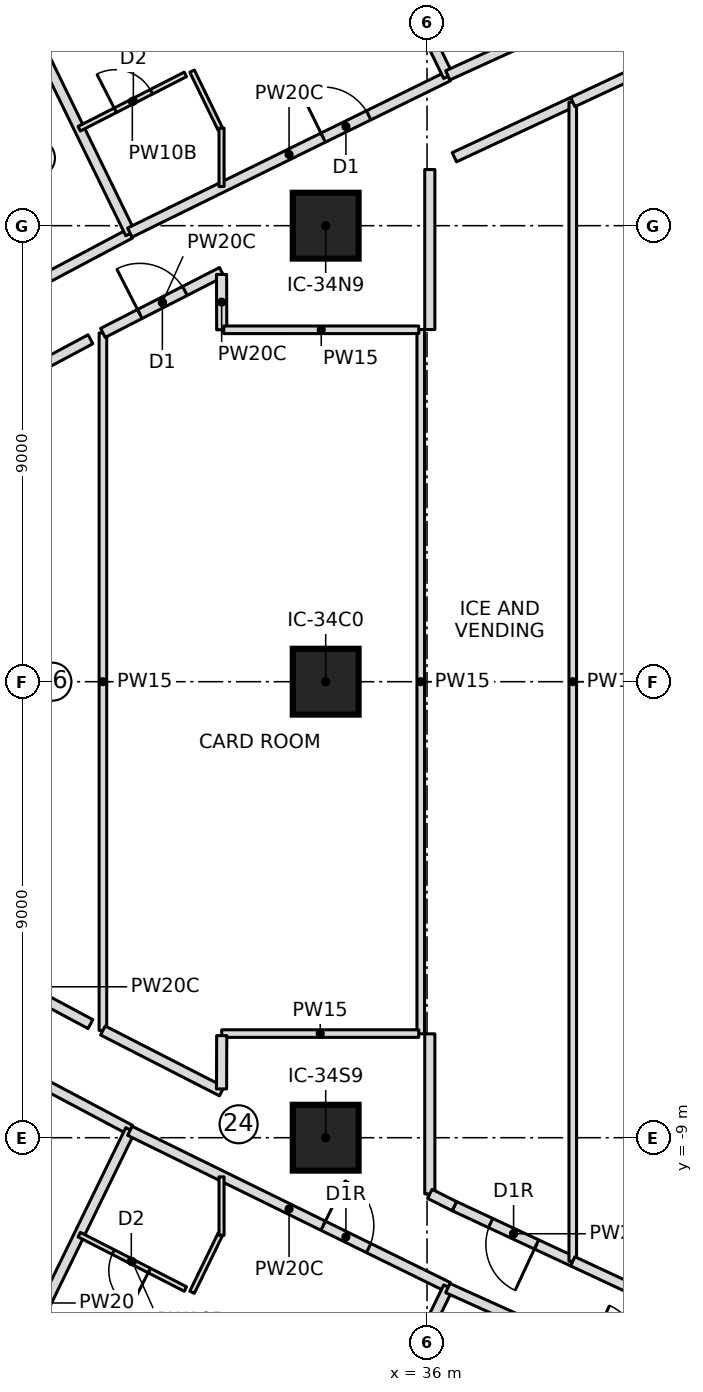
"""IFC4 building model, lengths in metres.
Left out: names, types, materials, properties, quantities, classifications, styles, units other than length and angle.
Written with IfcOpenShell. Run it as: python <this file> out.ifc"""

import sys

from ifc_helpers import new_model, si_unit, direction, frame, frame_2d, origin, origin_2d, place, context, subcontext, project, spatial, rectangle, extrude, element, fill, save


model = new_model("IFC4")
c1 = context("Model", 3, precision=1e-05, world=origin(), true_north=direction((0.0, 1.0)))
c2 = subcontext(c1, "Body", "Model", "MODEL_VIEW")
j1 = project(units=[si_unit("LENGTHUNIT", "METRE"), si_unit("PLANEANGLEUNIT", "RADIAN")], contexts=[c1])
p1 = place(None, origin())
s1 = spatial("IfcSite", under=j1, at=p1, CompositionType="ELEMENT")
p2 = place(p1, origin())
s2 = spatial("IfcBuilding", under=s1, at=p2, CompositionType="ELEMENT")
p3 = place(p2, frame((0.0, 0.0, 68.0)))
s3 = spatial("IfcBuildingStorey", under=s2, at=p3, CompositionType="ELEMENT", Elevation=68.0)
for number, where, z_axis, x_axis in (
    (1, (34.0, -9.0, 0.0), (0.0, 0.0, 1.0), (1.0, 0.0, 0.0)),
    (2, (34.0, 0.0, 0.0), (0.0, 0.0, 1.0), (1.0, 0.0, 0.0)),
    (3, (34.0, 9.0, 0.0), (0.0, 0.0, 1.0), (1.0, 0.0, 0.0)),
):
    element("IfcColumn", number, at=place(p3, frame(where, z_axis=z_axis, x_axis=x_axis)), inside=s3, PredefinedType="COLUMN", context=c2, shape_type="SweptSolid", body=[
        extrude(rectangle(XDim=1.3, YDim=1.3, at=origin_2d()), origin(), (0.0, 0.0, 1.0), 3.55),
    ])
p4 = place(p3, frame((23.957, 5.564, 0.0), z_axis=(0.0, 0.0, 1.0), x_axis=(0.883455325405, 0.468515408513, 0.0)))
e4 = element("IfcWall", 4, at=p4, inside=s3, PredefinedType="PARTITIONING", context=c2, shape_type="SweptSolid", body=[
    extrude(rectangle(XDim=7.004, YDim=0.2, at=frame_2d((3.502, 0.0))), origin(), (0.0, 0.0, 1.0), 3.25),
])
p5 = place(p4, frame((3.7, 0.0, 0.0)))
e5 = element("IfcOpeningElement", 5, at=p5, cuts=e4, PredefinedType="OPENING", context=c2, shape_type="SweptSolid", body=[
    extrude(rectangle(XDim=1.0, YDim=2.1, at=frame_2d((0.5, 1.05))), frame((0.0, 0.11, 0.0), z_axis=(0.0, -1.0, 0.0), x_axis=(1.0, 0.0, 0.0)), (0.0, 0.0, 1.0), 0.22),
])
p6 = place(p3, frame((30.144, 8.846, 0.0), z_axis=(0.0, 0.0, 1.0), x_axis=(-0.438185054829, 0.898884785567, 0.0)))
e6 = element("IfcWall", 6, at=p6, inside=s3, PredefinedType="PARTITIONING", context=c2, shape_type="SweptSolid", body=[
    extrude(rectangle(XDim=7.601, YDim=0.2, at=frame_2d((3.801, 0.0))), origin(), (0.0, 0.0, 1.0), 3.25),
])
p7 = place(p3, frame((30.135, 8.864, 0.0), z_axis=(0.0, 0.0, 1.0), x_axis=(0.897599118183, 0.44081268475, 0.0)))
e7 = element("IfcWall", 7, at=p7, inside=s3, PredefinedType="PARTITIONING", context=c2, shape_type="SweptSolid", body=[
    extrude(rectangle(XDim=7.0, YDim=0.2, at=frame_2d((3.5, 0.0))), origin(), (0.0, 0.0, 1.0), 3.25),
])
p8 = place(p7, frame((4.25, 0.0, 0.0)))
e8 = element("IfcOpeningElement", 8, at=p8, cuts=e7, PredefinedType="OPENING", context=c2, shape_type="SweptSolid", body=[
    extrude(rectangle(XDim=1.0, YDim=2.1, at=frame_2d((0.5, 1.05))), frame((0.0, 0.11, 0.0), z_axis=(0.0, -1.0, 0.0), x_axis=(1.0, 0.0, 0.0)), (0.0, 0.0, 1.0), 0.22),
])
p9 = place(p3, frame((29.136, 10.914, 0.0), z_axis=(0.0, 0.0, 1.0), x_axis=(0.890219804082, 0.45553122881, 0.0)))
e9 = element("IfcWall", 9, at=p9, inside=s3, PredefinedType="PARTITIONING", context=c2, shape_type="SweptSolid", body=[
    extrude(rectangle(XDim=2.354, YDim=0.1, at=frame_2d((1.177, 0.0))), origin(), (0.0, 0.0, 1.0), 3.25),
])
p10 = place(p9, frame((0.8, 0.0, 0.0)))
e10 = element("IfcOpeningElement", 10, at=p10, cuts=e9, PredefinedType="OPENING", context=c2, shape_type="SweptSolid", body=[
    extrude(rectangle(XDim=0.8, YDim=2.1, at=frame_2d((0.4, 1.05))), frame((0.0, 0.06, 0.0), z_axis=(0.0, -1.0, 0.0), x_axis=(1.0, 0.0, 0.0)), (0.0, 0.0, 1.0), 0.12),
])
p11 = place(p3, frame((31.363, 12.05, 0.0), z_axis=(0.0, 0.0, 1.0), x_axis=(0.438356099343, -0.898801385273, 0.0)))
e11 = element("IfcWall", 11, at=p11, inside=s3, PredefinedType="PARTITIONING", context=c2, shape_type="SweptSolid", body=[
    extrude(rectangle(XDim=1.282, YDim=0.1, at=frame_2d((0.641, 0.0))), origin(), (0.0, 0.0, 1.0), 3.25),
])
p12 = place(p3, frame((36.419, 11.949, 0.0), z_axis=(0.0, 0.0, 1.0), x_axis=(-0.438197705697, 0.898878618459, 0.0)))
e12 = element("IfcWall", 12, at=p12, inside=s3, PredefinedType="PARTITIONING", context=c2, shape_type="SweptSolid", body=[
    extrude(rectangle(XDim=7.601, YDim=0.2, at=frame_2d((3.801, 0.0))), origin(), (0.0, 0.0, 1.0), 3.25),
])
p13 = place(p3, frame((42.784, 14.867, 0.0), z_axis=(0.0, 0.0, 1.0), x_axis=(-0.910238677692, -0.414083988622, 0.0)))
e13 = element("IfcWall", 13, at=p13, inside=s3, PredefinedType="PARTITIONING", context=c2, shape_type="SweptSolid", body=[
    extrude(rectangle(XDim=7.003, YDim=0.2, at=frame_2d((3.501, 0.0))), origin(), (0.0, 0.0, 1.0), 3.25),
])
p14 = place(p13, frame((0.35, 0.0, 0.0)))
e14 = element("IfcOpeningElement", 14, at=p14, cuts=e13, PredefinedType="OPENING", context=c2, shape_type="SweptSolid", body=[
    extrude(rectangle(XDim=1.0, YDim=2.1, at=frame_2d((0.5, 1.05))), frame((0.0, 0.11, 0.0), z_axis=(0.0, -1.0, 0.0), x_axis=(1.0, 0.0, 0.0)), (0.0, 0.0, 1.0), 0.22),
])
p15 = place(p3, frame((23.957, -5.564, 0.0), z_axis=(0.0, 0.0, 1.0), x_axis=(0.883455325405, -0.468515408513, 0.0)))
e15 = element("IfcWall", 15, at=p15, inside=s3, PredefinedType="PARTITIONING", context=c2, shape_type="SweptSolid", body=[
    extrude(rectangle(XDim=7.004, YDim=0.2, at=frame_2d((3.502, 0.0))), origin(), (0.0, 0.0, 1.0), 3.25),
])
p16 = place(p15, frame((3.7, 0.0, 0.0)))
e16 = element("IfcOpeningElement", 16, at=p16, cuts=e15, PredefinedType="OPENING", context=c2, shape_type="SweptSolid", body=[
    extrude(rectangle(XDim=1.0, YDim=2.1, at=frame_2d((0.5, 1.05))), frame((0.0, 0.11, 0.0), z_axis=(0.0, -1.0, 0.0), x_axis=(1.0, 0.0, 0.0)), (0.0, 0.0, 1.0), 0.22),
])
p17 = place(p3, frame((26.813, -15.678, 0.0), z_axis=(0.0, 0.0, 1.0), x_axis=(0.438185054829, 0.898884785567, 0.0)))
e17 = element("IfcWall", 17, at=p17, inside=s3, PredefinedType="PARTITIONING", context=c2, shape_type="SweptSolid", body=[
    extrude(rectangle(XDim=7.601, YDim=0.2, at=frame_2d((3.801, 0.0))), origin(), (0.0, 0.0, 1.0), 3.25),
])
p18 = place(p3, frame((30.135, -8.864, 0.0), z_axis=(0.0, 0.0, 1.0), x_axis=(0.897599118183, -0.44081268475, 0.0)))
e18 = element("IfcWall", 18, at=p18, inside=s3, PredefinedType="PARTITIONING", context=c2, shape_type="SweptSolid", body=[
    extrude(rectangle(XDim=7.0, YDim=0.2, at=frame_2d((3.5, 0.0))), origin(), (0.0, 0.0, 1.0), 3.25),
])
p19 = place(p18, frame((4.25, 0.0, 0.0)))
e19 = element("IfcOpeningElement", 19, at=p19, cuts=e18, PredefinedType="OPENING", context=c2, shape_type="SweptSolid", body=[
    extrude(rectangle(XDim=1.0, YDim=2.1, at=frame_2d((0.5, 1.05))), frame((0.0, 0.11, 0.0), z_axis=(0.0, -1.0, 0.0), x_axis=(1.0, 0.0, 0.0)), (0.0, 0.0, 1.0), 0.22),
])
p20 = place(p3, frame((31.925, -10.898, 0.0), z_axis=(0.0, 0.0, 1.0), x_axis=(-0.438356099343, -0.898801385273, 0.0)))
e20 = element("IfcWall", 20, at=p20, inside=s3, PredefinedType="PARTITIONING", context=c2, shape_type="SweptSolid", body=[
    extrude(rectangle(XDim=1.282, YDim=0.1, at=frame_2d((0.641, 0.0))), origin(), (0.0, 0.0, 1.0), 3.25),
])
p21 = place(p3, frame((31.232, -11.986, 0.0), z_axis=(0.0, 0.0, 1.0), x_axis=(-0.890219804082, 0.45553122881, 0.0)))
e21 = element("IfcWall", 21, at=p21, inside=s3, PredefinedType="PARTITIONING", context=c2, shape_type="SweptSolid", body=[
    extrude(rectangle(XDim=2.354, YDim=0.1, at=frame_2d((1.177, 0.0))), origin(), (0.0, 0.0, 1.0), 3.25),
])
p22 = place(p21, frame((0.8, 0.0, 0.0)))
e22 = element("IfcOpeningElement", 22, at=p22, cuts=e21, PredefinedType="OPENING", context=c2, shape_type="SweptSolid", body=[
    extrude(rectangle(XDim=0.8, YDim=2.1, at=frame_2d((0.4, 1.05))), frame((0.0, 0.06, 0.0), z_axis=(0.0, -1.0, 0.0), x_axis=(1.0, 0.0, 0.0)), (0.0, 0.0, 1.0), 0.12),
])
p23 = place(p3, frame((33.088, -18.782, 0.0), z_axis=(0.0, 0.0, 1.0), x_axis=(0.438197705697, 0.898878618459, 0.0)))
e23 = element("IfcWall", 23, at=p23, inside=s3, PredefinedType="PARTITIONING", context=c2, shape_type="SweptSolid", body=[
    extrude(rectangle(XDim=7.601, YDim=0.2, at=frame_2d((3.801, 0.0))), origin(), (0.0, 0.0, 1.0), 3.25),
])
p24 = place(p3, frame((36.41, -11.968, 0.0), z_axis=(0.0, 0.0, 1.0), x_axis=(0.911422478094, -0.411471829443, 0.0)))
e24 = element("IfcWall", 24, at=p24, inside=s3, PredefinedType="PARTITIONING", context=c2, shape_type="SweptSolid", body=[
    extrude(rectangle(XDim=7.003, YDim=0.2, at=frame_2d((3.501, 0.0))), origin(), (0.0, 0.0, 1.0), 3.25),
])
p25 = place(p24, frame((3.05, 0.0, 0.0)))
e25 = element("IfcOpeningElement", 25, at=p25, cuts=e24, PredefinedType="OPENING", context=c2, shape_type="SweptSolid", body=[
    extrude(rectangle(XDim=1.0, YDim=2.1, at=frame_2d((0.5, 1.05))), frame((0.0, 0.11, 0.0), z_axis=(0.0, -1.0, 0.0), x_axis=(1.0, 0.0, 0.0)), (0.0, 0.0, 1.0), 0.22),
])
p26 = place(p3, frame((29.357, -6.758, 0.0), z_axis=(0.0, 0.0, 1.0), x_axis=(-0.881637943627, 0.471926409895, 0.0)))
e26 = element("IfcWall", 26, at=p26, inside=s3, PredefinedType="PARTITIONING", context=c2, shape_type="SweptSolid", body=[
    extrude(rectangle(XDim=3.124, YDim=0.2, at=frame_2d((1.562, 0.0))), origin(), (0.0, 0.0, 1.0), 3.25),
])
p27 = place(p26, frame((1.062, 0.0, 0.0)))
e27 = element("IfcOpeningElement", 27, at=p27, cuts=e26, PredefinedType="OPENING", context=c2, shape_type="SweptSolid", body=[
    extrude(rectangle(XDim=1.0, YDim=2.1, at=frame_2d((0.5, 1.05))), frame((0.0, 0.11, 0.0), z_axis=(0.0, -1.0, 0.0), x_axis=(1.0, 0.0, 0.0)), (0.0, 0.0, 1.0), 0.22),
])
p28 = place(p3, frame((26.604, 5.284, 0.0), z_axis=(0.0, 0.0, 1.0), x_axis=(0.881637943627, 0.471926409895, 0.0)))
e28 = element("IfcWall", 28, at=p28, inside=s3, PredefinedType="PARTITIONING", context=c2, shape_type="SweptSolid", body=[
    extrude(rectangle(XDim=3.124, YDim=0.2, at=frame_2d((1.562, 0.0))), origin(), (0.0, 0.0, 1.0), 3.25),
])
p29 = place(p3, frame((29.604, -6.884, 0.0), z_axis=(0.0, 0.0, 1.0), x_axis=(0.0, 1.0, 0.0)))
e29 = element("IfcWall", 29, at=p29, inside=s3, PredefinedType="PARTITIONING", context=c2, shape_type="SweptSolid", body=[
    extrude(rectangle(XDim=13.768, YDim=0.15, at=frame_2d((6.884, 0.0))), origin(), (0.0, 0.0, 1.0), 3.25),
])
p30 = place(p3, frame((29.604, 6.884, 0.0), z_axis=(0.0, 0.0, 1.0), x_axis=(0.890220210981, 0.455530433628, 0.0)))
e30 = element("IfcWall", 30, at=p30, inside=s3, PredefinedType="PARTITIONING", context=c2, shape_type="SweptSolid", body=[
    extrude(rectangle(XDim=2.636, YDim=0.2, at=frame_2d((1.318, 0.0))), origin(), (0.0, 0.0, 1.0), 3.25),
])
p31 = place(p30, frame((0.818, 0.0, 0.0)))
e31 = element("IfcOpeningElement", 31, at=p31, cuts=e30, PredefinedType="OPENING", context=c2, shape_type="SweptSolid", body=[
    extrude(rectangle(XDim=1.0, YDim=2.1, at=frame_2d((0.5, 1.05))), frame((0.0, 0.11, 0.0), z_axis=(0.0, -1.0, 0.0), x_axis=(1.0, 0.0, 0.0)), (0.0, 0.0, 1.0), 0.22),
])
p32 = place(p3, frame((31.95, -8.085, 0.0), z_axis=(0.0, 0.0, 1.0), x_axis=(-0.890220210981, 0.455530433628, 0.0)))
e32 = element("IfcWall", 32, at=p32, inside=s3, PredefinedType="PARTITIONING", context=c2, shape_type="SweptSolid", body=[
    extrude(rectangle(XDim=2.636, YDim=0.2, at=frame_2d((1.318, 0.0))), origin(), (0.0, 0.0, 1.0), 3.25),
])
p33 = place(p3, frame((35.876, -6.95, 0.0), z_axis=(0.0, 0.0, 1.0), x_axis=(0.0, 1.0, 0.0)))
e33 = element("IfcWall", 33, at=p33, inside=s3, PredefinedType="PARTITIONING", context=c2, shape_type="SweptSolid", body=[
    extrude(rectangle(XDim=13.9, YDim=0.15, at=frame_2d((6.95, 0.0))), origin(), (0.0, 0.0, 1.0), 3.25),
])
p34 = place(p3, frame((38.876, -11.44, 0.0), z_axis=(0.0, 0.0, 1.0), x_axis=(-0.906347616376, 0.422532836937, 0.0)))
e34 = element("IfcWall", 34, at=p34, inside=s3, PredefinedType="PARTITIONING", context=c2, shape_type="SweptSolid", body=[
    extrude(rectangle(XDim=2.578, YDim=0.2, at=frame_2d((1.289, 0.0))), origin(), (0.0, 0.0, 1.0), 3.25),
])
p35 = place(p34, frame((0.789, 0.0, 0.0)))
e35 = element("IfcOpeningElement", 35, at=p35, cuts=e34, PredefinedType="OPENING", context=c2, shape_type="SweptSolid", body=[
    extrude(rectangle(XDim=1.0, YDim=2.1, at=frame_2d((0.5, 1.05))), frame((0.0, 0.11, 0.0), z_axis=(0.0, -1.0, 0.0), x_axis=(1.0, 0.0, 0.0)), (0.0, 0.0, 1.0), 0.22),
])
p36 = place(p3, frame((36.54, 10.351, 0.0), z_axis=(0.0, 0.0, 1.0), x_axis=(0.906347616376, 0.422532836937, 0.0)))
e36 = element("IfcWall", 36, at=p36, inside=s3, PredefinedType="PARTITIONING", context=c2, shape_type="SweptSolid", body=[
    extrude(rectangle(XDim=2.578, YDim=0.2, at=frame_2d((1.289, 0.0))), origin(), (0.0, 0.0, 1.0), 3.25),
])
p37 = place(p3, frame((38.876, -11.44, 0.0), z_axis=(0.0, 0.0, 1.0), x_axis=(0.0, 1.0, 0.0)))
e37 = element("IfcWall", 37, at=p37, inside=s3, PredefinedType="PARTITIONING", context=c2, shape_type="SweptSolid", body=[
    extrude(rectangle(XDim=22.88, YDim=0.15, at=frame_2d((11.44, 0.0))), origin(), (0.0, 0.0, 1.0), 3.25),
])
for number, where, z_axis, x_axis in (
    (38, (40.18, -12.048, 0.0), (0.0, 0.0, 1.0), (-0.906, 0.423, 0.0)),
    (39, (38.876, 11.44, 0.0), (0.0, 0.0, 1.0), (0.906, 0.423, 0.0)),
):
    element("IfcWall", number, at=place(p3, frame(where, z_axis=z_axis, x_axis=x_axis)), inside=s3, PredefinedType="PARTITIONING", context=c2, shape_type="SweptSolid", body=[
        extrude(rectangle(XDim=1.438, YDim=0.2, at=frame_2d((0.719, 0.0))), origin(), (0.0, 0.0, 1.0), 3.25),
    ])
for number, where, z_axis, x_axis in (
    (40, (31.945, 10.926, 0.0), (0.0, 0.0, 1.0), (0.0, -1.0, 0.0)),
    (41, (31.945, -9.773, 0.0), (0.0, 0.0, 1.0), (0.0, -1.0, 0.0)),
):
    element("IfcWall", number, at=place(p3, frame(where, z_axis=z_axis, x_axis=x_axis)), inside=s3, PredefinedType="PARTITIONING", context=c2, shape_type="SweptSolid", body=[
        extrude(rectangle(XDim=1.153, YDim=0.1, at=frame_2d((0.576, 0.0))), origin(), (0.0, 0.0, 1.0), 3.25),
    ])
p38 = place(p3, frame((35.836, -6.945, 0.0), z_axis=(0.0, 0.0, 1.0), x_axis=(-0.999999998028, -6.2798292e-05, 0.0)))
e42 = element("IfcWall", 42, at=p38, inside=s3, PredefinedType="PARTITIONING", context=c2, shape_type="SweptSolid", body=[
    extrude(rectangle(XDim=3.888, YDim=0.15, at=frame_2d((1.944, 0.0))), origin(), (0.0, 0.0, 1.0), 3.25),
])
p39 = place(p3, frame((31.948, -6.985, 0.0), z_axis=(0.0, 0.0, 1.0), x_axis=(-0.003248242724, -0.999994724446, 0.0)))
e43 = element("IfcWall", 43, at=p39, inside=s3, PredefinedType="PARTITIONING", context=c2, shape_type="SweptSolid", body=[
    extrude(rectangle(XDim=1.052, YDim=0.2, at=frame_2d((0.526, 0.0))), origin(), (0.0, 0.0, 1.0), 3.25),
])
p40 = place(p3, frame((31.945, 8.037, 0.0), z_axis=(0.0, 0.0, 1.0), x_axis=(0.003129875123, -0.999995101929, 0.0)))
e44 = element("IfcWall", 44, at=p40, inside=s3, PredefinedType="PARTITIONING", context=c2, shape_type="SweptSolid", body=[
    extrude(rectangle(XDim=1.092, YDim=0.2, at=frame_2d((0.546, 0.0))), origin(), (0.0, 0.0, 1.0), 3.25),
])
p41 = place(p3, frame((31.989, 6.945, 0.0), z_axis=(0.0, 0.0, 1.0), x_axis=(0.999999997987, -6.3451777e-05, 0.0)))
e45 = element("IfcWall", 45, at=p41, inside=s3, PredefinedType="PARTITIONING", context=c2, shape_type="SweptSolid", body=[
    extrude(rectangle(XDim=3.848, YDim=0.15, at=frame_2d((1.924, 0.0))), origin(), (0.0, 0.0, 1.0), 3.25),
])
for number, where, z_axis, x_axis in (
    (46, (36.055, -10.108, 0.0), (0.0, 0.0, 1.0), (0.0, 1.0, 0.0)),
    (47, (36.055, 6.95, 0.0), (0.0, 0.0, 1.0), (0.0, 1.0, 0.0)),
):
    element("IfcWall", number, at=place(p3, frame(where, z_axis=z_axis, x_axis=x_axis)), inside=s3, PredefinedType="PARTITIONING", context=c2, shape_type="SweptSolid", body=[
        extrude(rectangle(XDim=3.158, YDim=0.2, at=frame_2d((1.579, 0.0))), origin(), (0.0, 0.0, 1.0), 3.25),
    ])
p42 = place(p3, frame((36.54, -10.351, 0.0), z_axis=(0.0, 0.0, 1.0), x_axis=(-0.894337154042, 0.447393624116, 0.0)))
e48 = element("IfcWall", 48, at=p42, inside=s3, PredefinedType="PARTITIONING", context=c2, shape_type="SweptSolid", body=[
    extrude(rectangle(XDim=0.542, YDim=0.2, at=frame_2d((0.271, 0.0))), origin(), (0.0, 0.0, 1.0), 3.25),
])
p43 = place(p10, origin())
e49 = element("IfcDoor", 49, at=p43, inside=s3, OperationType="SINGLE_SWING_LEFT", PredefinedType="DOOR", context=c2, shape_type="SweptSolid", body=[
    extrude(rectangle(XDim=0.8, YDim=2.1, at=frame_2d((0.4, 1.05))), frame((0.0, 0.025, 0.0), z_axis=(0.0, -1.0, 0.0), x_axis=(1.0, 0.0, 0.0)), (0.0, 0.0, 1.0), 0.05),
])
fill(e10, e49)
p44 = place(p8, origin())
e50 = element("IfcDoor", 50, at=p44, inside=s3, OperationType="SINGLE_SWING_LEFT", PredefinedType="DOOR", context=c2, shape_type="SweptSolid", body=[
    extrude(rectangle(XDim=1.0, YDim=2.1, at=frame_2d((0.5, 1.05))), frame((0.0, 0.025, 0.0), z_axis=(0.0, -1.0, 0.0), x_axis=(1.0, 0.0, 0.0)), (0.0, 0.0, 1.0), 0.05),
])
fill(e8, e50)
p45 = place(p22, origin())
e51 = element("IfcDoor", 51, at=p45, inside=s3, OperationType="SINGLE_SWING_LEFT", PredefinedType="DOOR", context=c2, shape_type="SweptSolid", body=[
    extrude(rectangle(XDim=0.8, YDim=2.1, at=frame_2d((0.4, 1.05))), frame((0.0, 0.025, 0.0), z_axis=(0.0, -1.0, 0.0), x_axis=(1.0, 0.0, 0.0)), (0.0, 0.0, 1.0), 0.05),
])
fill(e22, e51)
p46 = place(p19, origin())
e52 = element("IfcDoor", 52, at=p46, inside=s3, OperationType="SINGLE_SWING_RIGHT", PredefinedType="DOOR", context=c2, shape_type="SweptSolid", body=[
    extrude(rectangle(XDim=1.0, YDim=2.1, at=frame_2d((0.5, 1.05))), frame((0.0, 0.025, 0.0), z_axis=(0.0, -1.0, 0.0), x_axis=(1.0, 0.0, 0.0)), (0.0, 0.0, 1.0), 0.05),
])
fill(e19, e52)
p47 = place(p31, origin())
e53 = element("IfcDoor", 53, at=p47, inside=s3, OperationType="SINGLE_SWING_LEFT", PredefinedType="DOOR", context=c2, shape_type="SweptSolid", body=[
    extrude(rectangle(XDim=1.0, YDim=2.1, at=frame_2d((0.5, 1.05))), frame((0.0, 0.025, 0.0), z_axis=(0.0, -1.0, 0.0), x_axis=(1.0, 0.0, 0.0)), (0.0, 0.0, 1.0), 0.05),
])
fill(e31, e53)
p48 = place(p35, origin())
e54 = element("IfcDoor", 54, at=p48, inside=s3, OperationType="SINGLE_SWING_RIGHT", PredefinedType="DOOR", context=c2, shape_type="SweptSolid", body=[
    extrude(rectangle(XDim=1.0, YDim=2.1, at=frame_2d((0.5, 1.05))), frame((0.0, 0.025, 0.0), z_axis=(0.0, -1.0, 0.0), x_axis=(1.0, 0.0, 0.0)), (0.0, 0.0, 1.0), 0.05),
])
fill(e35, e54)
save(model, sys.argv[1])
